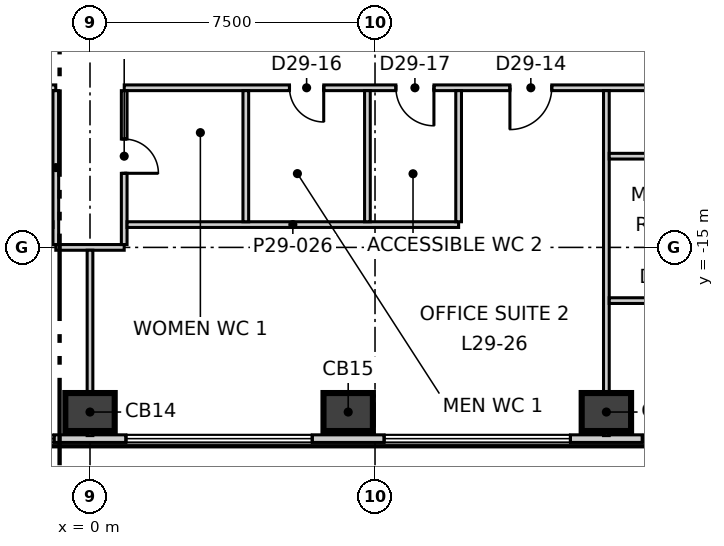
"""IFC4 building model, lengths in metres.
Left out: names, types, materials, properties, quantities, classifications, styles, units other than length and angle.
Written with IfcOpenShell. Run it as: python <this file> out.ifc"""

import sys

from ifc_helpers import new_model, si_unit, direction, frame, frame_2d, origin, origin_2d, place, context, subcontext, project, spatial, rectangle, extrude, element, fill, save


model = new_model("IFC4")
c1 = context("Model", 3, precision=1e-05, world=origin(), true_north=direction((0.0, 1.0)))
c2 = subcontext(c1, "Body", "Model", "MODEL_VIEW")
j1 = project(units=[si_unit("LENGTHUNIT", "METRE"), si_unit("PLANEANGLEUNIT", "RADIAN")], contexts=[c1])
p1 = place(None, origin())
s1 = spatial("IfcSite", under=j1, at=p1, CompositionType="ELEMENT")
p2 = place(p1, origin())
s2 = spatial("IfcBuilding", under=s1, at=p2, CompositionType="ELEMENT")
p3 = place(p2, frame((0.0, 0.0, 128.3)))
s3 = spatial("IfcBuildingStorey", under=s2, at=p3, CompositionType="ELEMENT", Elevation=128.3)
for number, where, z_axis, x_axis in (
    (1, (0.0, -19.332, -0.3), (0.0, 0.0, 1.0), (1.0, 0.0, 0.0)),
    (2, (6.794, -19.332, -0.3), (0.0, 0.0, 1.0), (1.0, 0.0, 0.0)),
    (3, (13.588, -19.332, -0.3), (0.0, 0.0, 1.0), (1.0, 0.0, 0.0)),
):
    element("IfcColumn", number, at=place(p3, frame(where, z_axis=z_axis, x_axis=x_axis)), inside=s3, PredefinedType="COLUMN", context=c2, shape_type="SweptSolid", body=[
        extrude(rectangle(XDim=1.3, YDim=1.0, at=origin_2d()), origin(), (0.0, 0.0, 1.0), 4.0),
    ])
p4 = place(p3, frame((-28.479, -20.032, 0.0), z_axis=(0.0, 0.0, 1.0), x_axis=(1.0, 0.0, 0.0)))
e4 = element("IfcWall", 4, at=p4, inside=s3, PredefinedType="ELEMENTEDWALL", context=c2, shape_type="SweptSolid", body=[
    extrude(rectangle(XDim=56.938, YDim=0.2, at=frame_2d((28.469, 0.0))), origin(), (0.0, 0.0, 1.0), 3.7),
])
p5 = place(p4, frame((2.25, 0.0, 0.9)))
e5 = element("IfcOpeningElement", 5, at=p5, cuts=e4, PredefinedType="OPENING", context=c2, shape_type="SweptSolid", body=[
    extrude(rectangle(XDim=4.9, YDim=2.5, at=frame_2d((2.45, 1.25))), frame((0.0, 0.11, 0.0), z_axis=(0.0, -1.0, 0.0), x_axis=(1.0, 0.0, 0.0)), (0.0, 0.0, 1.0), 0.22),
])
p6 = place(p4, frame((9.044, 0.0, 0.9)))
e6 = element("IfcOpeningElement", 6, at=p6, cuts=e4, PredefinedType="OPENING", context=c2, shape_type="SweptSolid", body=[
    extrude(rectangle(XDim=4.9, YDim=2.5, at=frame_2d((2.45, 1.25))), frame((0.0, 0.11, 0.0), z_axis=(0.0, -1.0, 0.0), x_axis=(1.0, 0.0, 0.0)), (0.0, 0.0, 1.0), 0.22),
])
p7 = place(p4, frame((15.838, 0.0, 0.9)))
e7 = element("IfcOpeningElement", 7, at=p7, cuts=e4, PredefinedType="OPENING", context=c2, shape_type="SweptSolid", body=[
    extrude(rectangle(XDim=4.9, YDim=2.5, at=frame_2d((2.45, 1.25))), frame((0.0, 0.11, 0.0), z_axis=(0.0, -1.0, 0.0), x_axis=(1.0, 0.0, 0.0)), (0.0, 0.0, 1.0), 0.22),
])
p8 = place(p4, frame((22.632, 0.0, 0.9)))
e8 = element("IfcOpeningElement", 8, at=p8, cuts=e4, PredefinedType="OPENING", context=c2, shape_type="SweptSolid", body=[
    extrude(rectangle(XDim=4.9, YDim=2.5, at=frame_2d((2.45, 1.25))), frame((0.0, 0.11, 0.0), z_axis=(0.0, -1.0, 0.0), x_axis=(1.0, 0.0, 0.0)), (0.0, 0.0, 1.0), 0.22),
])
p9 = place(p4, frame((29.426, 0.0, 0.9)))
e9 = element("IfcOpeningElement", 9, at=p9, cuts=e4, PredefinedType="OPENING", context=c2, shape_type="SweptSolid", body=[
    extrude(rectangle(XDim=4.9, YDim=2.5, at=frame_2d((2.45, 1.25))), frame((0.0, 0.11, 0.0), z_axis=(0.0, -1.0, 0.0), x_axis=(1.0, 0.0, 0.0)), (0.0, 0.0, 1.0), 0.22),
])
p10 = place(p4, frame((36.22, 0.0, 0.9)))
e10 = element("IfcOpeningElement", 10, at=p10, cuts=e4, PredefinedType="OPENING", context=c2, shape_type="SweptSolid", body=[
    extrude(rectangle(XDim=4.9, YDim=2.5, at=frame_2d((2.45, 1.25))), frame((0.0, 0.11, 0.0), z_axis=(0.0, -1.0, 0.0), x_axis=(1.0, 0.0, 0.0)), (0.0, 0.0, 1.0), 0.22),
])
p11 = place(p4, frame((43.014, 0.0, 0.9)))
e11 = element("IfcOpeningElement", 11, at=p11, cuts=e4, PredefinedType="OPENING", context=c2, shape_type="SweptSolid", body=[
    extrude(rectangle(XDim=4.9, YDim=2.5, at=frame_2d((2.45, 1.25))), frame((0.0, 0.11, 0.0), z_axis=(0.0, -1.0, 0.0), x_axis=(1.0, 0.0, 0.0)), (0.0, 0.0, 1.0), 0.22),
])
p12 = place(p4, frame((49.808, 0.0, 0.9)))
e12 = element("IfcOpeningElement", 12, at=p12, cuts=e4, PredefinedType="OPENING", context=c2, shape_type="SweptSolid", body=[
    extrude(rectangle(XDim=4.9, YDim=2.5, at=frame_2d((2.45, 1.25))), frame((0.0, 0.11, 0.0), z_axis=(0.0, -1.0, 0.0), x_axis=(1.0, 0.0, 0.0)), (0.0, 0.0, 1.0), 0.22),
])
p13 = place(p3, frame((31.588, -14.647, 0.0), z_axis=(0.0, 0.0, 1.0), x_axis=(-0.500005036527, 0.866022495925, 0.0)))
e13 = element("IfcWall", 13, at=p13, inside=s3, PredefinedType="ELEMENTEDWALL", context=c2, shape_type="SweptSolid", body=[
    extrude(rectangle(XDim=56.938, YDim=0.2, at=frame_2d((28.469, 0.0))), origin(), (0.0, 0.0, 1.0), 3.7),
])
p14 = place(p13, frame((2.25, 0.0, 0.9)))
e14 = element("IfcOpeningElement", 14, at=p14, cuts=e13, PredefinedType="OPENING", context=c2, shape_type="SweptSolid", body=[
    extrude(rectangle(XDim=4.9, YDim=2.5, at=frame_2d((2.45, 1.25))), frame((0.0, 0.11, 0.0), z_axis=(0.0, -1.0, 0.0), x_axis=(1.0, 0.0, 0.0)), (0.0, 0.0, 1.0), 0.22),
])
p15 = place(p13, frame((9.044, 0.0, 0.9)))
e15 = element("IfcOpeningElement", 15, at=p15, cuts=e13, PredefinedType="OPENING", context=c2, shape_type="SweptSolid", body=[
    extrude(rectangle(XDim=4.9, YDim=2.5, at=frame_2d((2.45, 1.25))), frame((0.0, 0.11, 0.0), z_axis=(0.0, -1.0, 0.0), x_axis=(1.0, 0.0, 0.0)), (0.0, 0.0, 1.0), 0.22),
])
p16 = place(p13, frame((15.838, 0.0, 0.9)))
e16 = element("IfcOpeningElement", 16, at=p16, cuts=e13, PredefinedType="OPENING", context=c2, shape_type="SweptSolid", body=[
    extrude(rectangle(XDim=4.9, YDim=2.5, at=frame_2d((2.45, 1.25))), frame((0.0, 0.11, 0.0), z_axis=(0.0, -1.0, 0.0), x_axis=(1.0, 0.0, 0.0)), (0.0, 0.0, 1.0), 0.22),
])
p17 = place(p13, frame((22.632, 0.0, 0.9)))
e17 = element("IfcOpeningElement", 17, at=p17, cuts=e13, PredefinedType="OPENING", context=c2, shape_type="SweptSolid", body=[
    extrude(rectangle(XDim=4.9, YDim=2.5, at=frame_2d((2.45, 1.25))), frame((0.0, 0.11, 0.0), z_axis=(0.0, -1.0, 0.0), x_axis=(1.0, 0.0, 0.0)), (0.0, 0.0, 1.0), 0.22),
])
p18 = place(p13, frame((29.426, 0.0, 0.9)))
e18 = element("IfcOpeningElement", 18, at=p18, cuts=e13, PredefinedType="OPENING", context=c2, shape_type="SweptSolid", body=[
    extrude(rectangle(XDim=4.9, YDim=2.5, at=frame_2d((2.45, 1.25))), frame((0.0, 0.11, 0.0), z_axis=(0.0, -1.0, 0.0), x_axis=(1.0, 0.0, 0.0)), (0.0, 0.0, 1.0), 0.22),
])
p19 = place(p13, frame((36.22, 0.0, 0.9)))
e19 = element("IfcOpeningElement", 19, at=p19, cuts=e13, PredefinedType="OPENING", context=c2, shape_type="SweptSolid", body=[
    extrude(rectangle(XDim=4.9, YDim=2.5, at=frame_2d((2.45, 1.25))), frame((0.0, 0.11, 0.0), z_axis=(0.0, -1.0, 0.0), x_axis=(1.0, 0.0, 0.0)), (0.0, 0.0, 1.0), 0.22),
])
p20 = place(p13, frame((43.014, 0.0, 0.9)))
e20 = element("IfcOpeningElement", 20, at=p20, cuts=e13, PredefinedType="OPENING", context=c2, shape_type="SweptSolid", body=[
    extrude(rectangle(XDim=4.9, YDim=2.5, at=frame_2d((2.45, 1.25))), frame((0.0, 0.11, 0.0), z_axis=(0.0, -1.0, 0.0), x_axis=(1.0, 0.0, 0.0)), (0.0, 0.0, 1.0), 0.22),
])
p21 = place(p13, frame((49.808, 0.0, 0.9)))
e21 = element("IfcOpeningElement", 21, at=p21, cuts=e13, PredefinedType="OPENING", context=c2, shape_type="SweptSolid", body=[
    extrude(rectangle(XDim=4.9, YDim=2.5, at=frame_2d((2.45, 1.25))), frame((0.0, 0.11, 0.0), z_axis=(0.0, -1.0, 0.0), x_axis=(1.0, 0.0, 0.0)), (0.0, 0.0, 1.0), 0.22),
])
p22 = place(p3, frame((-18.556, -10.8, 0.0), z_axis=(0.0, 0.0, 1.0), x_axis=(1.0, 0.0, 0.0)))
e22 = element("IfcWall", 22, at=p22, inside=s3, PredefinedType="PARTITIONING", context=c2, shape_type="SweptSolid", body=[
    extrude(rectangle(XDim=17.655, YDim=0.15, at=frame_2d((8.828, 0.0))), origin(), (0.0, 0.0, 1.0), 3.7),
])
p23 = place(p22, frame((1.9, 0.0, 0.0)))
e23 = element("IfcOpeningElement", 23, at=p23, cuts=e22, PredefinedType="OPENING", context=c2, shape_type="SweptSolid", body=[
    extrude(rectangle(XDim=1.1, YDim=2.1, at=frame_2d((0.55, 1.05))), frame((0.0, 0.085, 0.0), z_axis=(0.0, -1.0, 0.0), x_axis=(1.0, 0.0, 0.0)), (0.0, 0.0, 1.0), 0.17),
])
p24 = place(p22, frame((10.718, 0.0, 0.0)))
e24 = element("IfcOpeningElement", 24, at=p24, cuts=e22, PredefinedType="OPENING", context=c2, shape_type="SweptSolid", body=[
    extrude(rectangle(XDim=1.1, YDim=2.1, at=frame_2d((0.55, 1.05))), frame((0.0, 0.085, 0.0), z_axis=(0.0, -1.0, 0.0), x_axis=(1.0, 0.0, 0.0)), (0.0, 0.0, 1.0), 0.17),
])
p25 = place(p3, frame((0.901, -10.8, 0.0), z_axis=(0.0, 0.0, 1.0), x_axis=(1.0, 0.0, 0.0)))
e25 = element("IfcWall", 25, at=p25, inside=s3, PredefinedType="PARTITIONING", context=c2, shape_type="SweptSolid", body=[
    extrude(rectangle(XDim=17.805, YDim=0.15, at=frame_2d((8.903, 0.0))), origin(), (0.0, 0.0, 1.0), 3.7),
])
p26 = place(p25, frame((10.149, 0.0, 0.0)))
e26 = element("IfcOpeningElement", 26, at=p26, cuts=e25, PredefinedType="OPENING", context=c2, shape_type="SweptSolid", body=[
    extrude(rectangle(XDim=1.1, YDim=2.1, at=frame_2d((0.55, 1.05))), frame((0.0, 0.085, 0.0), z_axis=(0.0, -1.0, 0.0), x_axis=(1.0, 0.0, 0.0)), (0.0, 0.0, 1.0), 0.17),
])
p27 = place(p25, frame((4.349, 0.0, 0.0)))
e27 = element("IfcOpeningElement", 27, at=p27, cuts=e25, PredefinedType="OPENING", context=c2, shape_type="SweptSolid", body=[
    extrude(rectangle(XDim=0.9, YDim=2.1, at=frame_2d((0.45, 1.05))), frame((0.0, 0.085, 0.0), z_axis=(0.0, -1.0, 0.0), x_axis=(1.0, 0.0, 0.0)), (0.0, 0.0, 1.0), 0.17),
])
p28 = place(p25, frame((7.149, 0.0, 0.0)))
e28 = element("IfcOpeningElement", 28, at=p28, cuts=e25, PredefinedType="OPENING", context=c2, shape_type="SweptSolid", body=[
    extrude(rectangle(XDim=1.0, YDim=2.1, at=frame_2d((0.5, 1.05))), frame((0.0, 0.085, 0.0), z_axis=(0.0, -1.0, 0.0), x_axis=(1.0, 0.0, 0.0)), (0.0, 0.0, 1.0), 0.17),
])
p29 = place(p25, frame((14.737, 0.0, 0.0)))
e29 = element("IfcOpeningElement", 29, at=p29, cuts=e25, PredefinedType="OPENING", context=c2, shape_type="SweptSolid", body=[
    extrude(rectangle(XDim=1.1, YDim=2.1, at=frame_2d((0.55, 1.05))), frame((0.0, 0.085, 0.0), z_axis=(0.0, -1.0, 0.0), x_axis=(1.0, 0.0, 0.0)), (0.0, 0.0, 1.0), 0.17),
])
p30 = place(p3, frame((-0.9, -15.0, 0.0), z_axis=(0.0, 0.0, 1.0), x_axis=(1.0, 0.0, 0.0)))
e30 = element("IfcWall", 30, at=p30, inside=s3, PredefinedType="PARTITIONING", context=c2, shape_type="SweptSolid", body=[
    extrude(rectangle(XDim=1.8, YDim=0.15, at=frame_2d((0.9, 0.0))), origin(), (0.0, 0.0, 1.0), 3.7),
])
p31 = place(p3, frame((-0.9, -14.925, 0.0), z_axis=(0.0, 0.0, 1.0), x_axis=(0.0, 1.0, 0.0)))
e31 = element("IfcWall", 31, at=p31, inside=s3, PredefinedType="PARTITIONING", context=c2, shape_type="SweptSolid", body=[
    extrude(rectangle(XDim=4.049, YDim=0.15, at=frame_2d((2.024, 0.0))), origin(), (0.0, 0.0, 1.0), 3.7),
])
p32 = place(p3, frame((0.0, -19.952, 0.0), z_axis=(0.0, 0.0, 1.0), x_axis=(0.0, 1.0, 0.0)))
e32 = element("IfcWall", 32, at=p32, inside=s3, PredefinedType="PARTITIONING", context=c2, shape_type="SweptSolid", body=[
    extrude(rectangle(XDim=4.877, YDim=0.15, at=frame_2d((2.438, 0.0))), origin(), (0.0, 0.0, 1.0), 3.2),
])
p33 = place(p3, frame((0.9, -14.925, 0.0), z_axis=(0.0, 0.0, 1.0), x_axis=(0.0, 1.0, 0.0)))
e33 = element("IfcWall", 33, at=p33, inside=s3, PredefinedType="PARTITIONING", context=c2, shape_type="SweptSolid", body=[
    extrude(rectangle(XDim=4.049, YDim=0.15, at=frame_2d((2.024, 0.0))), origin(), (0.0, 0.0, 1.0), 3.7),
])
p34 = place(p33, frame((1.875, 0.0, 0.0)))
e34 = element("IfcOpeningElement", 34, at=p34, cuts=e33, PredefinedType="OPENING", context=c2, shape_type="SweptSolid", body=[
    extrude(rectangle(XDim=0.9, YDim=2.1, at=frame_2d((0.45, 1.05))), frame((0.0, 0.085, 0.0), z_axis=(0.0, -1.0, 0.0), x_axis=(1.0, 0.0, 0.0)), (0.0, 0.0, 1.0), 0.17),
])
p35 = place(p3, frame((13.201, -1.264, 0.0), z_axis=(0.0, 0.0, 1.0), x_axis=(0.499973466559, -0.866040722332, 0.0)))
e35 = element("IfcWall", 35, at=p35, inside=s3, PredefinedType="PARTITIONING", context=c2, shape_type="SweptSolid", body=[
    extrude(rectangle(XDim=10.861, YDim=0.15, at=frame_2d((5.43, 0.0))), origin(), (0.0, 0.0, 1.0), 3.7),
])
p36 = place(p35, frame((4.96, 0.0, 0.0)))
e36 = element("IfcOpeningElement", 36, at=p36, cuts=e35, PredefinedType="OPENING", context=c2, shape_type="SweptSolid", body=[
    extrude(rectangle(XDim=1.1, YDim=2.1, at=frame_2d((0.55, 1.05))), frame((0.0, 0.085, 0.0), z_axis=(0.0, -1.0, 0.0), x_axis=(1.0, 0.0, 0.0)), (0.0, 0.0, 1.0), 0.17),
])
p37 = place(p3, frame((0.975, -14.4, 0.0), z_axis=(0.0, 0.0, 1.0), x_axis=(1.0, 0.0, 0.0)))
e37 = element("IfcWall", 37, at=p37, inside=s3, PredefinedType="PARTITIONING", context=c2, shape_type="SweptSolid", body=[
    extrude(rectangle(XDim=8.725, YDim=0.15, at=frame_2d((4.362, 0.0))), origin(), (0.0, 0.0, 1.0), 3.7),
])
for number, where, z_axis, x_axis in (
    (38, (4.1, -14.325, 0.0), (0.0, 0.0, 1.0), (0.0, 1.0, 0.0)),
    (39, (9.7, -14.325, 0.0), (0.0, 0.0, 1.0), (0.0, 1.0, 0.0)),
    (40, (7.3, -14.325, 0.0), (0.0, 0.0, 1.0), (0.0, 1.0, 0.0)),
):
    element("IfcWall", number, at=place(p3, frame(where, z_axis=z_axis, x_axis=x_axis)), inside=s3, PredefinedType="PARTITIONING", context=c2, shape_type="SweptSolid", body=[
        extrude(rectangle(XDim=3.45, YDim=0.15, at=frame_2d((1.725, 0.0))), origin(), (0.0, 0.0, 1.0), 3.7),
    ])
p38 = place(p3, frame((13.588, -19.952, 0.0), z_axis=(0.0, 0.0, 1.0), x_axis=(0.0, 1.0, 0.0)))
e41 = element("IfcWall", 41, at=p38, inside=s3, PredefinedType="PARTITIONING", context=c2, shape_type="SweptSolid", body=[
    extrude(rectangle(XDim=9.077, YDim=0.15, at=frame_2d((4.539, 0.0))), origin(), (0.0, 0.0, 1.0), 3.7),
])
p39 = place(p3, frame((-13.513, -14.4, 0.0), z_axis=(0.0, 0.0, 1.0), x_axis=(1.0, 0.0, 0.0)))
e42 = element("IfcWall", 42, at=p39, inside=s3, PredefinedType="PARTITIONING", context=c2, shape_type="SweptSolid", body=[
    extrude(rectangle(XDim=12.538, YDim=0.15, at=frame_2d((6.269, 0.0))), origin(), (0.0, 0.0, 1.0), 3.7),
])
p40 = place(p39, frame((5.775, 0.0, 0.0)))
e43 = element("IfcOpeningElement", 43, at=p40, cuts=e42, PredefinedType="OPENING", context=c2, shape_type="SweptSolid", body=[
    extrude(rectangle(XDim=1.0, YDim=2.1, at=frame_2d((0.5, 1.05))), frame((0.0, 0.085, 0.0), z_axis=(0.0, -1.0, 0.0), x_axis=(1.0, 0.0, 0.0)), (0.0, 0.0, 1.0), 0.17),
])
p41 = place(p3, frame((13.663, -16.4, 0.0), z_axis=(0.0, 0.0, 1.0), x_axis=(1.0, 0.0, 0.0)))
e44 = element("IfcWall", 44, at=p41, inside=s3, PredefinedType="PARTITIONING", context=c2, shape_type="SweptSolid", body=[
    extrude(rectangle(XDim=3.525, YDim=0.15, at=frame_2d((1.762, 0.0))), origin(), (0.0, 0.0, 1.0), 3.7),
])
p42 = place(p41, frame((1.275, 0.0, 0.0)))
e45 = element("IfcOpeningElement", 45, at=p42, cuts=e44, PredefinedType="OPENING", context=c2, shape_type="SweptSolid", body=[
    extrude(rectangle(XDim=0.9, YDim=2.1, at=frame_2d((0.45, 1.05))), frame((0.0, 0.085, 0.0), z_axis=(0.0, -1.0, 0.0), x_axis=(1.0, 0.0, 0.0)), (0.0, 0.0, 1.0), 0.17),
])
p43 = place(p3, frame((13.663, -12.6, 0.0), z_axis=(0.0, 0.0, 1.0), x_axis=(1.0, 0.0, 0.0)))
e46 = element("IfcWall", 46, at=p43, inside=s3, PredefinedType="PARTITIONING", context=c2, shape_type="SweptSolid", body=[
    extrude(rectangle(XDim=5.725, YDim=0.15, at=frame_2d((2.862, 0.0))), origin(), (0.0, 0.0, 1.0), 3.7),
])
p44 = place(p8, origin())
e47 = element("IfcWindow", 47, at=p44, inside=s3, PartitioningType="SINGLE_PANEL", PredefinedType="WINDOW", context=c2, shape_type="SweptSolid", body=[
    extrude(rectangle(XDim=4.9, YDim=2.5, at=frame_2d((2.45, 1.25))), frame((0.0, 0.03, 0.0), z_axis=(0.0, -1.0, 0.0), x_axis=(1.0, 0.0, 0.0)), (0.0, 0.0, 1.0), 0.06),
])
fill(e8, e47)
p45 = place(p9, origin())
e48 = element("IfcWindow", 48, at=p45, inside=s3, PartitioningType="SINGLE_PANEL", PredefinedType="WINDOW", context=c2, shape_type="SweptSolid", body=[
    extrude(rectangle(XDim=4.9, YDim=2.5, at=frame_2d((2.45, 1.25))), frame((0.0, 0.03, 0.0), z_axis=(0.0, -1.0, 0.0), x_axis=(1.0, 0.0, 0.0)), (0.0, 0.0, 1.0), 0.06),
])
fill(e9, e48)
p46 = place(p10, origin())
e49 = element("IfcWindow", 49, at=p46, inside=s3, PartitioningType="SINGLE_PANEL", PredefinedType="WINDOW", context=c2, shape_type="SweptSolid", body=[
    extrude(rectangle(XDim=4.9, YDim=2.5, at=frame_2d((2.45, 1.25))), frame((0.0, 0.03, 0.0), z_axis=(0.0, -1.0, 0.0), x_axis=(1.0, 0.0, 0.0)), (0.0, 0.0, 1.0), 0.06),
])
fill(e10, e49)
p47 = place(p11, origin())
e50 = element("IfcWindow", 50, at=p47, inside=s3, PartitioningType="SINGLE_PANEL", PredefinedType="WINDOW", context=c2, shape_type="SweptSolid", body=[
    extrude(rectangle(XDim=4.9, YDim=2.5, at=frame_2d((2.45, 1.25))), frame((0.0, 0.03, 0.0), z_axis=(0.0, -1.0, 0.0), x_axis=(1.0, 0.0, 0.0)), (0.0, 0.0, 1.0), 0.06),
])
fill(e11, e50)
p48 = place(p26, origin())
e51 = element("IfcDoor", 51, at=p48, inside=s3, OperationType="SINGLE_SWING_LEFT", PredefinedType="DOOR", context=c2, shape_type="SweptSolid", body=[
    extrude(rectangle(XDim=1.1, YDim=2.1, at=frame_2d((0.55, 1.05))), frame((0.0, 0.025, 0.0), z_axis=(0.0, -1.0, 0.0), x_axis=(1.0, 0.0, 0.0)), (0.0, 0.0, 1.0), 0.05),
])
fill(e26, e51)
p49 = place(p34, origin())
e52 = element("IfcDoor", 52, at=p49, inside=s3, OperationType="SINGLE_SWING_LEFT", PredefinedType="DOOR", context=c2, shape_type="SweptSolid", body=[
    extrude(rectangle(XDim=0.9, YDim=2.1, at=frame_2d((0.45, 1.05))), frame((0.0, 0.025, 0.0), z_axis=(0.0, -1.0, 0.0), x_axis=(1.0, 0.0, 0.0)), (0.0, 0.0, 1.0), 0.05),
])
fill(e34, e52)
p50 = place(p27, origin())
e53 = element("IfcDoor", 53, at=p50, inside=s3, OperationType="SINGLE_SWING_RIGHT", PredefinedType="DOOR", context=c2, shape_type="SweptSolid", body=[
    extrude(rectangle(XDim=0.9, YDim=2.1, at=frame_2d((0.45, 1.05))), frame((0.0, 0.025, 0.0), z_axis=(0.0, -1.0, 0.0), x_axis=(1.0, 0.0, 0.0)), (0.0, 0.0, 1.0), 0.05),
])
fill(e27, e53)
p51 = place(p28, origin())
e54 = element("IfcDoor", 54, at=p51, inside=s3, OperationType="SINGLE_SWING_RIGHT", PredefinedType="DOOR", context=c2, shape_type="SweptSolid", body=[
    extrude(rectangle(XDim=1.0, YDim=2.1, at=frame_2d((0.5, 1.05))), frame((0.0, 0.025, 0.0), z_axis=(0.0, -1.0, 0.0), x_axis=(1.0, 0.0, 0.0)), (0.0, 0.0, 1.0), 0.05),
])
fill(e28, e54)
save(model, sys.argv[1])
